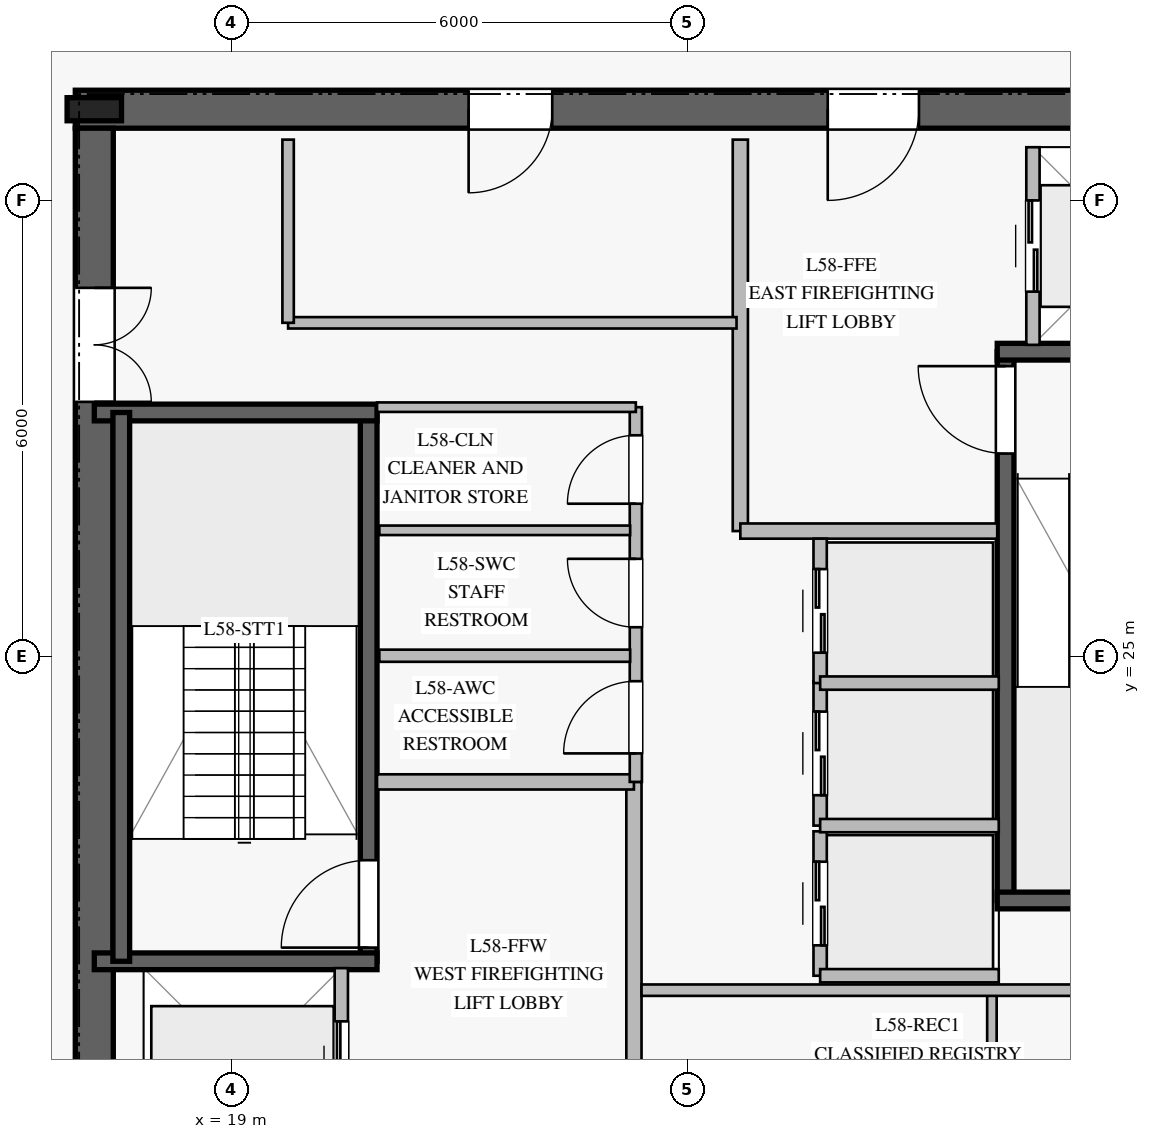
"""IFC4 building model, lengths in metres.
Left out: names, types, materials, properties, quantities, classifications, styles, units other than length and angle.
Written with IfcOpenShell. Run it as: python <this file> out.ifc"""

import sys

from ifc_helpers import new_model, si_unit, direction, frame, frame_2d, origin, origin_2d, place, context, subcontext, project, spatial, rectangle, i_section, extrude, element, fill, save


model = new_model("IFC4")
c1 = context("Model", 3, precision=1e-05, world=origin(), true_north=direction((0.0, 1.0)))
c2 = subcontext(c1, "Body", "Model", "MODEL_VIEW")
j1 = project(units=[si_unit("LENGTHUNIT", "METRE"), si_unit("PLANEANGLEUNIT", "RADIAN")], contexts=[c1])
p1 = place(None, origin())
s1 = spatial("IfcSite", under=j1, at=p1, CompositionType="ELEMENT")
p2 = place(p1, origin())
s2 = spatial("IfcBuilding", under=s1, at=p2, CompositionType="ELEMENT")
p3 = place(p2, frame((0.0, 0.0, 240.8)))
s3 = spatial("IfcBuildingStorey", under=s2, at=p3, CompositionType="ELEMENT", Elevation=240.8)
p4 = place(p3, frame((33.05, 32.2, 0.0), z_axis=(0.0, 0.0, 1.0), x_axis=(-1.0, 0.0, 0.0)))
e1 = element("IfcWall", 1, at=p4, inside=s3, PredefinedType="SHEAR", context=c2, shape_type="SweptSolid", body=[
    extrude(rectangle(XDim=16.1, YDim=0.5, at=frame_2d((8.05, 0.0))), origin(), (0.0, 0.0, 1.0), 3.7),
])
p5 = place(p4, frame((5.0, 0.0, 0.0)))
e2 = element("IfcOpeningElement", 2, at=p5, cuts=e1, PredefinedType="OPENING", context=c2, shape_type="SweptSolid", body=[
    extrude(rectangle(XDim=1.2, YDim=2.25, at=frame_2d((0.6, 1.125))), frame((0.0, 0.26, 0.0), z_axis=(0.0, -1.0, 0.0), x_axis=(1.0, 0.0, 0.0)), (0.0, 0.0, 1.0), 0.52),
])
p6 = place(p4, frame((9.825, 0.0, 0.0)))
e3 = element("IfcOpeningElement", 3, at=p6, cuts=e1, PredefinedType="OPENING", context=c2, shape_type="SweptSolid", body=[
    extrude(rectangle(XDim=1.1, YDim=2.2, at=frame_2d((0.55, 1.1))), frame((0.0, 0.26, 0.0), z_axis=(0.0, -1.0, 0.0), x_axis=(1.0, 0.0, 0.0)), (0.0, 0.0, 1.0), 0.52),
])
p7 = place(p3, frame((17.2, 31.95, 0.0), z_axis=(0.0, 0.0, 1.0), x_axis=(0.0, -1.0, 0.0)))
e4 = element("IfcWall", 4, at=p7, inside=s3, PredefinedType="SHEAR", context=c2, shape_type="SweptSolid", body=[
    extrude(rectangle(XDim=13.9, YDim=0.5, at=frame_2d((6.95, 0.0))), origin(), (0.0, 0.0, 1.0), 3.7),
])
p8 = place(p7, frame((2.1, 0.0, 0.0)))
e5 = element("IfcOpeningElement", 5, at=p8, cuts=e4, PredefinedType="OPENING", context=c2, shape_type="SweptSolid", body=[
    extrude(rectangle(XDim=1.5, YDim=2.2, at=frame_2d((0.75, 1.1))), frame((0.0, 0.26, 0.0), z_axis=(0.0, -1.0, 0.0), x_axis=(1.0, 0.0, 0.0)), (0.0, 0.0, 1.0), 0.52),
])
p9 = place(p3, frame((17.2, 32.2, 0.0), z_axis=(0.0, 0.0, 1.0), x_axis=(1.0, 0.0, 0.0)))
e6 = element("IfcColumn", 6, at=p9, inside=s3, PredefinedType="COLUMN", context=c2, shape_type="SweptSolid", body=[
    extrude(i_section(OverallWidth=0.304, OverallDepth=0.716, WebThickness=0.021, FlangeThickness=0.04, at=origin_2d()), origin(), (0.0, 0.0, 1.0), 4.0),
])
p10 = place(p3, frame((20.81, 20.99, 0.0), z_axis=(0.0, 0.0, 1.0), x_axis=(0.0, 1.0, 0.0)))
e7 = element("IfcWall", 7, at=p10, inside=s3, PredefinedType="SOLIDWALL", context=c2, shape_type="SweptSolid", body=[
    extrude(rectangle(XDim=7.22, YDim=0.22, at=frame_2d((3.61, 0.0))), origin(), (0.0, 0.0, 1.0), 3.7),
])
p11 = place(p10, frame((0.18, 0.0, 0.0)))
e8 = element("IfcOpeningElement", 8, at=p11, cuts=e7, PredefinedType="OPENING", context=c2, shape_type="SweptSolid", body=[
    extrude(rectangle(XDim=1.15, YDim=2.2, at=frame_2d((0.575, 1.1))), frame((0.0, 0.12, 0.0), z_axis=(0.0, -1.0, 0.0), x_axis=(1.0, 0.0, 0.0)), (0.0, 0.0, 1.0), 0.24),
])
for number, where, z_axis, x_axis in (
    (9, (17.2, 20.99, 0.0), (0.0, 0.0, 1.0), (1.0, 0.0, 0.0)),
    (10, (17.2, 28.21, 0.0), (0.0, 0.0, 1.0), (1.0, 0.0, 0.0)),
):
    element("IfcWall", number, at=place(p3, frame(where, z_axis=z_axis, x_axis=x_axis)), inside=s3, PredefinedType="SOLIDWALL", context=c2, shape_type="SweptSolid", body=[
        extrude(rectangle(XDim=3.72, YDim=0.22, at=frame_2d((1.86, 0.0))), origin(), (0.0, 0.0, 1.0), 3.7),
    ])
p12 = place(p3, frame((17.555, 28.21, 0.0), z_axis=(0.0, 0.0, 1.0), x_axis=(0.0, -1.0, 0.0)))
e11 = element("IfcWall", 11, at=p12, inside=s3, PredefinedType="SOLIDWALL", context=c2, shape_type="SweptSolid", body=[
    extrude(rectangle(XDim=7.22, YDim=0.22, at=frame_2d((3.61, 0.0))), origin(), (0.0, 0.0, 1.0), 3.7),
])
p13 = place(p3, frame((29.19, 21.79, 0.0), z_axis=(0.0, 0.0, 1.0), x_axis=(0.0, 1.0, 0.0)))
e12 = element("IfcWall", 12, at=p13, inside=s3, PredefinedType="SOLIDWALL", context=c2, shape_type="SweptSolid", body=[
    extrude(rectangle(XDim=7.22, YDim=0.22, at=frame_2d((3.61, 0.0))), origin(), (0.0, 0.0, 1.0), 3.7),
])
p14 = place(p13, frame((5.88, 0.0, 0.0)))
e13 = element("IfcOpeningElement", 13, at=p14, cuts=e12, PredefinedType="OPENING", context=c2, shape_type="SweptSolid", body=[
    extrude(rectangle(XDim=1.15, YDim=2.2, at=frame_2d((0.575, 1.1))), frame((0.0, 0.12, 0.0), z_axis=(0.0, -1.0, 0.0), x_axis=(1.0, 0.0, 0.0)), (0.0, 0.0, 1.0), 0.24),
])
for number, where, z_axis, x_axis in (
    (14, (29.08, 21.79, 0.0), (0.0, 0.0, 1.0), (1.0, 0.0, 0.0)),
    (15, (29.08, 29.01, 0.0), (0.0, 0.0, 1.0), (1.0, 0.0, 0.0)),
):
    element("IfcWall", number, at=place(p3, frame(where, z_axis=z_axis, x_axis=x_axis)), inside=s3, PredefinedType="SOLIDWALL", context=c2, shape_type="SweptSolid", body=[
        extrude(rectangle(XDim=3.72, YDim=0.22, at=frame_2d((1.86, 0.0))), origin(), (0.0, 0.0, 1.0), 3.7),
    ])
p15 = place(p3, frame((24.3, 18.2, 0.0), z_axis=(0.0, 0.0, 1.0), x_axis=(0.0, 1.0, 0.0)))
e16 = element("IfcWall", 16, at=p15, inside=s3, PredefinedType="PARTITIONING", context=c2, shape_type="SweptSolid", body=[
    extrude(rectangle(XDim=5.15, YDim=0.2, at=frame_2d((2.575, 0.0))), origin(), (0.0, 0.0, 1.0), 3.7),
])
p16 = place(p3, frame((20.92, 23.35, 0.0), z_axis=(0.0, 0.0, 1.0), x_axis=(1.0, 0.0, 0.0)))
e17 = element("IfcWall", 17, at=p16, inside=s3, PredefinedType="PARTITIONING", context=c2, shape_type="SweptSolid", body=[
    extrude(rectangle(XDim=3.38, YDim=0.2, at=frame_2d((1.69, 0.0))), origin(), (0.0, 0.0, 1.0), 3.7),
])
p17 = place(p3, frame((25.7, 26.65, 0.0), z_axis=(0.0, 0.0, 1.0), x_axis=(0.0, 1.0, 0.0)))
e18 = element("IfcWall", 18, at=p17, inside=s3, PredefinedType="PARTITIONING", context=c2, shape_type="SweptSolid", body=[
    extrude(rectangle(XDim=5.15, YDim=0.2, at=frame_2d((2.575, 0.0))), origin(), (0.0, 0.0, 1.0), 3.7),
])
p18 = place(p3, frame((25.7, 26.65, 0.0), z_axis=(0.0, 0.0, 1.0), x_axis=(1.0, 0.0, 0.0)))
e19 = element("IfcWall", 19, at=p18, inside=s3, PredefinedType="PARTITIONING", context=c2, shape_type="SweptSolid", body=[
    extrude(rectangle(XDim=3.38, YDim=0.2, at=frame_2d((1.69, 0.0))), origin(), (0.0, 0.0, 1.0), 3.7),
])
p19 = place(p3, frame((24.325, 23.35, 0.0), z_axis=(0.0, 0.0, 1.0), x_axis=(0.0, 1.0, 0.0)))
e20 = element("IfcWall", 20, at=p19, inside=s3, PredefinedType="PLUMBINGWALL", context=c2, shape_type="SweptSolid", body=[
    extrude(rectangle(XDim=4.93, YDim=0.16, at=frame_2d((2.465, 0.0))), origin(), (0.0, 0.0, 1.0), 3.7),
])
p20 = place(p19, frame((0.375, 0.0, 0.0)))
e21 = element("IfcOpeningElement", 21, at=p20, cuts=e20, PredefinedType="OPENING", context=c2, shape_type="SweptSolid", body=[
    extrude(rectangle(XDim=0.95, YDim=2.1, at=frame_2d((0.475, 1.05))), frame((0.0, 0.09, 0.0), z_axis=(0.0, -1.0, 0.0), x_axis=(1.0, 0.0, 0.0)), (0.0, 0.0, 1.0), 0.18),
])
p21 = place(p19, frame((2.035, 0.0, 0.0)))
e22 = element("IfcOpeningElement", 22, at=p21, cuts=e20, PredefinedType="OPENING", context=c2, shape_type="SweptSolid", body=[
    extrude(rectangle(XDim=0.9, YDim=2.1, at=frame_2d((0.45, 1.05))), frame((0.0, 0.09, 0.0), z_axis=(0.0, -1.0, 0.0), x_axis=(1.0, 0.0, 0.0)), (0.0, 0.0, 1.0), 0.18),
])
p22 = place(p19, frame((3.66, 0.0, 0.0)))
e23 = element("IfcOpeningElement", 23, at=p22, cuts=e20, PredefinedType="OPENING", context=c2, shape_type="SweptSolid", body=[
    extrude(rectangle(XDim=0.9, YDim=2.1, at=frame_2d((0.45, 1.05))), frame((0.0, 0.09, 0.0), z_axis=(0.0, -1.0, 0.0), x_axis=(1.0, 0.0, 0.0)), (0.0, 0.0, 1.0), 0.18),
])
p23 = place(p3, frame((20.92, 28.28, 0.0), z_axis=(0.0, 0.0, 1.0), x_axis=(1.0, 0.0, 0.0)))
e24 = element("IfcWall", 24, at=p23, inside=s3, PredefinedType="PARTITIONING", context=c2, shape_type="SweptSolid", body=[
    extrude(rectangle(XDim=3.405, YDim=0.125, at=frame_2d((1.703, 0.0))), origin(), (0.0, 0.0, 1.0), 3.7),
])
p24 = place(p3, frame((29.01, 18.05, 0.0), z_axis=(0.0, 0.0, 1.0), x_axis=(0.0, 1.0, 0.0)))
e25 = element("IfcWall", 25, at=p24, inside=s3, PredefinedType="PARTITIONING", context=c2, shape_type="SweptSolid", body=[
    extrude(rectangle(XDim=2.5, YDim=0.125, at=frame_2d((1.25, 0.0))), origin(), (0.0, 0.0, 1.0), 3.0),
])
p25 = place(p3, frame((20.95, 25.01, 0.0), z_axis=(0.0, 0.0, 1.0), x_axis=(1.0, 0.0, 0.0)))
e26 = element("IfcWall", 26, at=p25, inside=s3, PredefinedType="PLUMBINGWALL", context=c2, shape_type="SweptSolid", body=[
    extrude(rectangle(XDim=3.3, YDim=0.16, at=frame_2d((1.65, 0.0))), origin(), (0.0, 0.0, 1.0), 3.7),
])
p26 = place(p3, frame((20.95, 26.66, 0.0), z_axis=(0.0, 0.0, 1.0), x_axis=(1.0, 0.0, 0.0)))
e27 = element("IfcWall", 27, at=p26, inside=s3, PredefinedType="PARTITIONING", context=c2, shape_type="SweptSolid", body=[
    extrude(rectangle(XDim=3.3, YDim=0.125, at=frame_2d((1.65, 0.0))), origin(), (0.0, 0.0, 1.0), 3.7),
])
p27 = place(p3, frame((24.4, 20.61, 0.0), z_axis=(0.0, 0.0, 1.0), x_axis=(1.0, 0.0, 0.0)))
e28 = element("IfcWall", 28, at=p27, inside=s3, PredefinedType="PARTITIONING", context=c2, shape_type="SweptSolid", body=[
    extrude(rectangle(XDim=5.9, YDim=0.15, at=frame_2d((2.95, 0.0))), origin(), (0.0, 0.0, 1.0), 3.7),
])
p28 = place(p3, frame((19.75, 29.39, 0.0), z_axis=(0.0, 0.0, 1.0), x_axis=(1.0, 0.0, 0.0)))
e29 = element("IfcWall", 29, at=p28, inside=s3, PredefinedType="PARTITIONING", context=c2, shape_type="SweptSolid", body=[
    extrude(rectangle(XDim=5.9, YDim=0.15, at=frame_2d((2.95, 0.0))), origin(), (0.0, 0.0, 1.0), 3.7),
])
p29 = place(p3, frame((19.75, 29.39, 0.0), z_axis=(0.0, 0.0, 1.0), x_axis=(0.0, 1.0, 0.0)))
e30 = element("IfcWall", 30, at=p29, inside=s3, PredefinedType="PARTITIONING", context=c2, shape_type="SweptSolid", body=[
    extrude(rectangle(XDim=2.41, YDim=0.15, at=frame_2d((1.205, 0.0))), origin(), (0.0, 0.0, 1.0), 3.7),
])
p30 = place(p3, frame((26.75, 20.8, 0.0), z_axis=(0.0, 0.0, 1.0), x_axis=(0.0, 1.0, 0.0)))
e31 = element("IfcWall", 31, at=p30, inside=s3, PredefinedType="PARTITIONING", context=c2, shape_type="SweptSolid", body=[
    extrude(rectangle(XDim=1.9, YDim=0.175, at=frame_2d((0.95, 0.0))), origin(), (0.0, 0.0, 1.0), 3.7),
])
p31 = place(p30, frame((0.4, 0.0, 0.0)))
e32 = element("IfcOpeningElement", 32, at=p31, cuts=e31, PredefinedType="OPENING", context=c2, shape_type="SweptSolid", body=[
    extrude(rectangle(XDim=1.1, YDim=2.2, at=frame_2d((0.55, 1.1))), frame((0.0, 0.098, 0.0), z_axis=(0.0, -1.0, 0.0), x_axis=(1.0, 0.0, 0.0)), (0.0, 0.0, 1.0), 0.195),
])
p32 = place(p3, frame((26.75, 20.8, 0.0), z_axis=(0.0, 0.0, 1.0), x_axis=(1.0, 0.0, 0.0)))
e33 = element("IfcWall", 33, at=p32, inside=s3, PredefinedType="PARTITIONING", context=c2, shape_type="SweptSolid", body=[
    extrude(rectangle(XDim=2.35, YDim=0.175, at=frame_2d((1.175, 0.0))), origin(), (0.0, 0.0, 1.0), 3.7),
])
p33 = place(p3, frame((26.75, 22.775, 0.0), z_axis=(0.0, 0.0, 1.0), x_axis=(0.0, 1.0, 0.0)))
e34 = element("IfcWall", 34, at=p33, inside=s3, PredefinedType="PARTITIONING", context=c2, shape_type="SweptSolid", body=[
    extrude(rectangle(XDim=1.9, YDim=0.175, at=frame_2d((0.95, 0.0))), origin(), (0.0, 0.0, 1.0), 3.7),
])
p34 = place(p33, frame((0.4, 0.0, 0.0)))
e35 = element("IfcOpeningElement", 35, at=p34, cuts=e34, PredefinedType="OPENING", context=c2, shape_type="SweptSolid", body=[
    extrude(rectangle(XDim=1.1, YDim=2.2, at=frame_2d((0.55, 1.1))), frame((0.0, 0.098, 0.0), z_axis=(0.0, -1.0, 0.0), x_axis=(1.0, 0.0, 0.0)), (0.0, 0.0, 1.0), 0.195),
])
p35 = place(p3, frame((26.75, 22.775, 0.0), z_axis=(0.0, 0.0, 1.0), x_axis=(1.0, 0.0, 0.0)))
e36 = element("IfcWall", 36, at=p35, inside=s3, PredefinedType="PARTITIONING", context=c2, shape_type="SweptSolid", body=[
    extrude(rectangle(XDim=2.35, YDim=0.175, at=frame_2d((1.175, 0.0))), origin(), (0.0, 0.0, 1.0), 3.7),
])
p36 = place(p3, frame((26.75, 24.65, 0.0), z_axis=(0.0, 0.0, 1.0), x_axis=(0.0, 1.0, 0.0)))
e37 = element("IfcWall", 37, at=p36, inside=s3, PredefinedType="PARTITIONING", context=c2, shape_type="SweptSolid", body=[
    extrude(rectangle(XDim=1.9, YDim=0.175, at=frame_2d((0.95, 0.0))), origin(), (0.0, 0.0, 1.0), 3.7),
])
p37 = place(p36, frame((0.4, 0.0, 0.0)))
e38 = element("IfcOpeningElement", 38, at=p37, cuts=e37, PredefinedType="OPENING", context=c2, shape_type="SweptSolid", body=[
    extrude(rectangle(XDim=1.1, YDim=2.2, at=frame_2d((0.55, 1.1))), frame((0.0, 0.098, 0.0), z_axis=(0.0, -1.0, 0.0), x_axis=(1.0, 0.0, 0.0)), (0.0, 0.0, 1.0), 0.195),
])
p38 = place(p3, frame((26.75, 24.65, 0.0), z_axis=(0.0, 0.0, 1.0), x_axis=(1.0, 0.0, 0.0)))
e39 = element("IfcWall", 39, at=p38, inside=s3, PredefinedType="PARTITIONING", context=c2, shape_type="SweptSolid", body=[
    extrude(rectangle(XDim=2.35, YDim=0.175, at=frame_2d((1.175, 0.0))), origin(), (0.0, 0.0, 1.0), 3.7),
])
p39 = place(p3, frame((20.45, 18.3, 0.0), z_axis=(0.0, 0.0, 1.0), x_axis=(0.0, 1.0, 0.0)))
e40 = element("IfcWall", 40, at=p39, inside=s3, PredefinedType="PARTITIONING", context=c2, shape_type="SweptSolid", body=[
    extrude(rectangle(XDim=2.6, YDim=0.175, at=frame_2d((1.3, 0.0))), origin(), (0.0, 0.0, 1.0), 3.7),
])
p40 = place(p39, frame((0.7, 0.0, 0.0)))
e41 = element("IfcOpeningElement", 41, at=p40, cuts=e40, PredefinedType="OPENING", context=c2, shape_type="SweptSolid", body=[
    extrude(rectangle(XDim=1.2, YDim=2.2, at=frame_2d((0.6, 1.1))), frame((0.0, 0.098, 0.0), z_axis=(0.0, -1.0, 0.0), x_axis=(1.0, 0.0, 0.0)), (0.0, 0.0, 1.0), 0.195),
])
p41 = place(p3, frame((29.55, 29.1, 0.0), z_axis=(0.0, 0.0, 1.0), x_axis=(0.0, 1.0, 0.0)))
e42 = element("IfcWall", 42, at=p41, inside=s3, PredefinedType="PARTITIONING", context=c2, shape_type="SweptSolid", body=[
    extrude(rectangle(XDim=2.6, YDim=0.175, at=frame_2d((1.3, 0.0))), origin(), (0.0, 0.0, 1.0), 3.7),
])
p42 = place(p41, frame((0.7, 0.0, 0.0)))
e43 = element("IfcOpeningElement", 43, at=p42, cuts=e42, PredefinedType="OPENING", context=c2, shape_type="SweptSolid", body=[
    extrude(rectangle(XDim=1.2, YDim=2.2, at=frame_2d((0.6, 1.1))), frame((0.0, 0.098, 0.0), z_axis=(0.0, -1.0, 0.0), x_axis=(1.0, 0.0, 0.0)), (0.0, 0.0, 1.0), 0.195),
])
p43 = place(p11, origin())
e44 = element("IfcDoor", 44, at=p43, inside=s3, OperationType="SINGLE_SWING_LEFT", PredefinedType="DOOR", context=c2, shape_type="SweptSolid", body=[
    extrude(rectangle(XDim=1.15, YDim=2.2, at=frame_2d((0.575, 1.1))), frame((0.0, 0.025, 0.0), z_axis=(0.0, -1.0, 0.0), x_axis=(1.0, 0.0, 0.0)), (0.0, 0.0, 1.0), 0.05),
])
fill(e8, e44)
p44 = place(p14, origin())
e45 = element("IfcDoor", 45, at=p44, inside=s3, OperationType="SINGLE_SWING_RIGHT", PredefinedType="DOOR", context=c2, shape_type="SweptSolid", body=[
    extrude(rectangle(XDim=1.15, YDim=2.2, at=frame_2d((0.575, 1.1))), frame((0.0, 0.025, 0.0), z_axis=(0.0, -1.0, 0.0), x_axis=(1.0, 0.0, 0.0)), (0.0, 0.0, 1.0), 0.05),
])
fill(e13, e45)
p45 = place(p5, origin())
e46 = element("IfcDoor", 46, at=p45, inside=s3, OperationType="SINGLE_SWING_RIGHT", PredefinedType="DOOR", context=c2, shape_type="SweptSolid", body=[
    extrude(rectangle(XDim=1.2, YDim=2.25, at=frame_2d((0.6, 1.125))), frame((0.0, 0.025, 0.0), z_axis=(0.0, -1.0, 0.0), x_axis=(1.0, 0.0, 0.0)), (0.0, 0.0, 1.0), 0.05),
])
fill(e2, e46)
p46 = place(p8, origin())
e47 = element("IfcDoor", 47, at=p46, inside=s3, OperationType="DOUBLE_DOOR_SINGLE_SWING", PredefinedType="DOOR", context=c2, shape_type="SweptSolid", body=[
    extrude(rectangle(XDim=1.5, YDim=2.2, at=frame_2d((0.75, 1.1))), frame((0.0, 0.025, 0.0), z_axis=(0.0, -1.0, 0.0), x_axis=(1.0, 0.0, 0.0)), (0.0, 0.0, 1.0), 0.05),
])
fill(e5, e47)
p47 = place(p20, origin())
e48 = element("IfcDoor", 48, at=p47, inside=s3, OperationType="SINGLE_SWING_LEFT", PredefinedType="DOOR", context=c2, shape_type="SweptSolid", body=[
    extrude(rectangle(XDim=0.95, YDim=2.1, at=frame_2d((0.475, 1.05))), frame((0.0, 0.025, 0.0), z_axis=(0.0, -1.0, 0.0), x_axis=(1.0, 0.0, 0.0)), (0.0, 0.0, 1.0), 0.05),
])
fill(e21, e48)
p48 = place(p21, origin())
e49 = element("IfcDoor", 49, at=p48, inside=s3, OperationType="SINGLE_SWING_RIGHT", PredefinedType="DOOR", context=c2, shape_type="SweptSolid", body=[
    extrude(rectangle(XDim=0.9, YDim=2.1, at=frame_2d((0.45, 1.05))), frame((0.0, 0.025, 0.0), z_axis=(0.0, -1.0, 0.0), x_axis=(1.0, 0.0, 0.0)), (0.0, 0.0, 1.0), 0.05),
])
fill(e22, e49)
p49 = place(p22, origin())
e50 = element("IfcDoor", 50, at=p49, inside=s3, OperationType="SINGLE_SWING_LEFT", PredefinedType="DOOR", context=c2, shape_type="SweptSolid", body=[
    extrude(rectangle(XDim=0.9, YDim=2.1, at=frame_2d((0.45, 1.05))), frame((0.0, 0.025, 0.0), z_axis=(0.0, -1.0, 0.0), x_axis=(1.0, 0.0, 0.0)), (0.0, 0.0, 1.0), 0.05),
])
fill(e23, e50)
p50 = place(p6, origin())
e51 = element("IfcDoor", 51, at=p50, inside=s3, OperationType="SINGLE_SWING_RIGHT", PredefinedType="DOOR", context=c2, shape_type="SweptSolid", body=[
    extrude(rectangle(XDim=1.1, YDim=2.2, at=frame_2d((0.55, 1.1))), frame((0.0, 0.025, 0.0), z_axis=(0.0, -1.0, 0.0), x_axis=(1.0, 0.0, 0.0)), (0.0, 0.0, 1.0), 0.05),
])
fill(e3, e51)
p51 = place(p31, origin())
e52 = element("IfcDoor", 52, at=p51, inside=s3, OperationType="DOUBLE_DOOR_SLIDING", PredefinedType="DOOR", context=c2, shape_type="SweptSolid", body=[
    extrude(rectangle(XDim=1.1, YDim=2.2, at=frame_2d((0.55, 1.1))), frame((0.0, 0.025, 0.0), z_axis=(0.0, -1.0, 0.0), x_axis=(1.0, 0.0, 0.0)), (0.0, 0.0, 1.0), 0.05),
])
fill(e32, e52)
p52 = place(p34, origin())
e53 = element("IfcDoor", 53, at=p52, inside=s3, OperationType="DOUBLE_DOOR_SLIDING", PredefinedType="DOOR", context=c2, shape_type="SweptSolid", body=[
    extrude(rectangle(XDim=1.1, YDim=2.2, at=frame_2d((0.55, 1.1))), frame((0.0, 0.025, 0.0), z_axis=(0.0, -1.0, 0.0), x_axis=(1.0, 0.0, 0.0)), (0.0, 0.0, 1.0), 0.05),
])
fill(e35, e53)
p53 = place(p37, origin())
e54 = element("IfcDoor", 54, at=p53, inside=s3, OperationType="DOUBLE_DOOR_SLIDING", PredefinedType="DOOR", context=c2, shape_type="SweptSolid", body=[
    extrude(rectangle(XDim=1.1, YDim=2.2, at=frame_2d((0.55, 1.1))), frame((0.0, 0.025, 0.0), z_axis=(0.0, -1.0, 0.0), x_axis=(1.0, 0.0, 0.0)), (0.0, 0.0, 1.0), 0.05),
])
fill(e38, e54)
p54 = place(p40, origin())
e55 = element("IfcDoor", 55, at=p54, inside=s3, OperationType="DOUBLE_DOOR_SLIDING", PredefinedType="DOOR", context=c2, shape_type="SweptSolid", body=[
    extrude(rectangle(XDim=1.2, YDim=2.2, at=frame_2d((0.6, 1.1))), frame((0.0, 0.025, 0.0), z_axis=(0.0, -1.0, 0.0), x_axis=(1.0, 0.0, 0.0)), (0.0, 0.0, 1.0), 0.05),
])
fill(e41, e55)
p55 = place(p42, origin())
e56 = element("IfcDoor", 56, at=p55, inside=s3, OperationType="DOUBLE_DOOR_SLIDING", PredefinedType="DOOR", context=c2, shape_type="SweptSolid", body=[
    extrude(rectangle(XDim=1.2, YDim=2.2, at=frame_2d((0.6, 1.1))), frame((0.0, 0.025, 0.0), z_axis=(0.0, -1.0, 0.0), x_axis=(1.0, 0.0, 0.0)), (0.0, 0.0, 1.0), 0.05),
])
fill(e43, e56)
save(model, sys.argv[1])
